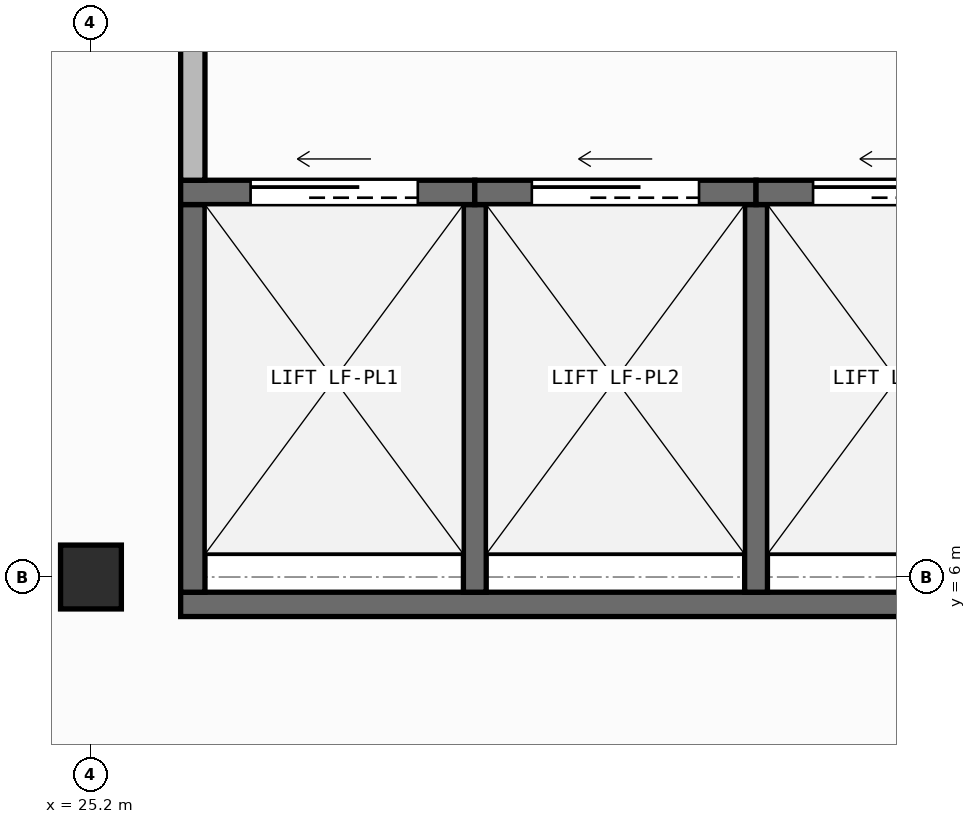
"""IFC4 building model, lengths in metres.
Left out: names, types, materials, properties, quantities, classifications, styles, units other than length and angle.
Written with IfcOpenShell. Run it as: python <this file> out.ifc"""

import sys

from ifc_helpers import new_model, si_unit, direction, frame, frame_2d, origin, origin_2d, place, context, subcontext, project, spatial, rectangle, i_section, extrude, element, fill, save


model = new_model("IFC4")
c1 = context("Model", 3, precision=1e-05, world=origin(), true_north=direction((0.0, 1.0)))
c2 = subcontext(c1, "Body", "Model", "MODEL_VIEW")
j1 = project(units=[si_unit("LENGTHUNIT", "METRE"), si_unit("PLANEANGLEUNIT", "RADIAN")], contexts=[c1])
p1 = place(None, origin())
s1 = spatial("IfcSite", under=j1, at=p1, CompositionType="ELEMENT")
p2 = place(p1, origin())
s2 = spatial("IfcBuilding", under=s1, at=p2, CompositionType="ELEMENT")
p3 = place(p2, frame((0.0, 0.0, 4.5)))
s3 = spatial("IfcBuildingStorey", under=s2, at=p3, CompositionType="ELEMENT", Elevation=4.5)
p4 = place(p3, frame((25.2, 6.0, 0.0), z_axis=(0.0, 0.0, 1.0), x_axis=(1.0, 0.0, 0.0)))
e1 = element("IfcColumn", 1, at=p4, inside=s3, PredefinedType="COLUMN", context=c2, shape_type="SweptSolid", body=[
    extrude(i_section(OverallWidth=0.4, OverallDepth=0.42, WebThickness=0.025, FlangeThickness=0.04, at=origin_2d()), origin(), (0.0, 0.0, 1.0), 4.5),
])
p5 = place(p3, frame((25.79, 5.82, 0.0), z_axis=(0.0, 0.0, 1.0), x_axis=(1.0, 0.0, 0.0)))
e2 = element("IfcWall", 2, at=p5, inside=s3, PredefinedType="SHEAR", context=c2, shape_type="SweptSolid", body=[
    extrude(rectangle(XDim=5.72, YDim=0.16, at=frame_2d((2.86, 0.0))), origin(), (0.0, 0.0, 1.0), 4.25),
])
p6 = place(p3, frame((25.87, 5.9, 0.0), z_axis=(0.0, 0.0, 1.0), x_axis=(0.0, 1.0, 0.0)))
e3 = element("IfcWall", 3, at=p6, inside=s3, PredefinedType="SHEAR", context=c2, shape_type="SweptSolid", body=[
    extrude(rectangle(XDim=2.55, YDim=0.16, at=frame_2d((1.275, 0.0))), origin(), (0.0, 0.0, 1.0), 4.25),
])
for number, where, z_axis, x_axis in (
    (4, (27.725, 5.9, 0.0), (0.0, 0.0, 1.0), (0.0, 1.0, 0.0)),
    (5, (29.575, 5.9, 0.0), (0.0, 0.0, 1.0), (0.0, 1.0, 0.0)),
):
    element("IfcWall", number, at=place(p3, frame(where, z_axis=z_axis, x_axis=x_axis)), inside=s3, PredefinedType="SHEAR", context=c2, shape_type="SweptSolid", body=[
        extrude(rectangle(XDim=2.55, YDim=0.15, at=frame_2d((1.275, 0.0))), origin(), (0.0, 0.0, 1.0), 4.25),
    ])
p7 = place(p3, frame((25.79, 8.53, 0.0), z_axis=(0.0, 0.0, 1.0), x_axis=(1.0, 0.0, 0.0)))
e6 = element("IfcWall", 6, at=p7, inside=s3, PredefinedType="SHEAR", context=c2, shape_type="SweptSolid", body=[
    extrude(rectangle(XDim=1.935, YDim=0.16, at=frame_2d((0.968, 0.0))), origin(), (0.0, 0.0, 1.0), 4.25),
])
p8 = place(p7, frame((0.46, 0.0, 0.0)))
e7 = element("IfcOpeningElement", 7, at=p8, cuts=e6, PredefinedType="OPENING", context=c2, shape_type="SweptSolid", body=[
    extrude(rectangle(XDim=1.1, YDim=2.15, at=frame_2d((0.55, 1.075))), frame((0.0, 0.09, 0.0), z_axis=(0.0, -1.0, 0.0), x_axis=(1.0, 0.0, 0.0)), (0.0, 0.0, 1.0), 0.18),
])
p9 = place(p3, frame((27.725, 8.53, 0.0), z_axis=(0.0, 0.0, 1.0), x_axis=(1.0, 0.0, 0.0)))
e8 = element("IfcWall", 8, at=p9, inside=s3, PredefinedType="SHEAR", context=c2, shape_type="SweptSolid", body=[
    extrude(rectangle(XDim=1.85, YDim=0.16, at=frame_2d((0.925, 0.0))), origin(), (0.0, 0.0, 1.0), 4.25),
])
p10 = place(p9, frame((0.375, 0.0, 0.0)))
e9 = element("IfcOpeningElement", 9, at=p10, cuts=e8, PredefinedType="OPENING", context=c2, shape_type="SweptSolid", body=[
    extrude(rectangle(XDim=1.1, YDim=2.15, at=frame_2d((0.55, 1.075))), frame((0.0, 0.09, 0.0), z_axis=(0.0, -1.0, 0.0), x_axis=(1.0, 0.0, 0.0)), (0.0, 0.0, 1.0), 0.18),
])
p11 = place(p3, frame((29.575, 8.53, 0.0), z_axis=(0.0, 0.0, 1.0), x_axis=(1.0, 0.0, 0.0)))
e10 = element("IfcWall", 10, at=p11, inside=s3, PredefinedType="SHEAR", context=c2, shape_type="SweptSolid", body=[
    extrude(rectangle(XDim=1.935, YDim=0.16, at=frame_2d((0.968, 0.0))), origin(), (0.0, 0.0, 1.0), 4.25),
])
p12 = place(p11, frame((0.375, 0.0, 0.0)))
e11 = element("IfcOpeningElement", 11, at=p12, cuts=e10, PredefinedType="OPENING", context=c2, shape_type="SweptSolid", body=[
    extrude(rectangle(XDim=1.1, YDim=2.15, at=frame_2d((0.55, 1.075))), frame((0.0, 0.09, 0.0), z_axis=(0.0, -1.0, 0.0), x_axis=(1.0, 0.0, 0.0)), (0.0, 0.0, 1.0), 0.18),
])
p13 = place(p3, frame((25.87, 8.61, 0.0), z_axis=(0.0, 0.0, 1.0), x_axis=(0.0, 1.0, 0.0)))
e12 = element("IfcWall", 12, at=p13, inside=s3, PredefinedType="PARTITIONING", context=c2, shape_type="SweptSolid", body=[
    extrude(rectangle(XDim=3.39, YDim=0.16, at=frame_2d((1.695, 0.0))), origin(), (0.0, 0.0, 1.0), 4.25),
])
p14 = place(p8, origin())
e13 = element("IfcDoor", 13, at=p14, inside=s3, OperationType="SLIDING_TO_LEFT", PredefinedType="DOOR", context=c2, shape_type="SweptSolid", body=[
    extrude(rectangle(XDim=1.1, YDim=2.15, at=frame_2d((0.55, 1.075))), frame((0.0, 0.025, 0.0), z_axis=(0.0, -1.0, 0.0), x_axis=(1.0, 0.0, 0.0)), (0.0, 0.0, 1.0), 0.05),
])
fill(e7, e13)
p15 = place(p10, origin())
e14 = element("IfcDoor", 14, at=p15, inside=s3, OperationType="SLIDING_TO_LEFT", PredefinedType="DOOR", context=c2, shape_type="SweptSolid", body=[
    extrude(rectangle(XDim=1.1, YDim=2.15, at=frame_2d((0.55, 1.075))), frame((0.0, 0.025, 0.0), z_axis=(0.0, -1.0, 0.0), x_axis=(1.0, 0.0, 0.0)), (0.0, 0.0, 1.0), 0.05),
])
fill(e9, e14)
p16 = place(p12, origin())
e15 = element("IfcDoor", 15, at=p16, inside=s3, OperationType="SLIDING_TO_LEFT", PredefinedType="DOOR", context=c2, shape_type="SweptSolid", body=[
    extrude(rectangle(XDim=1.1, YDim=2.15, at=frame_2d((0.55, 1.075))), frame((0.0, 0.025, 0.0), z_axis=(0.0, -1.0, 0.0), x_axis=(1.0, 0.0, 0.0)), (0.0, 0.0, 1.0), 0.05),
])
fill(e11, e15)
save(model, sys.argv[1])
